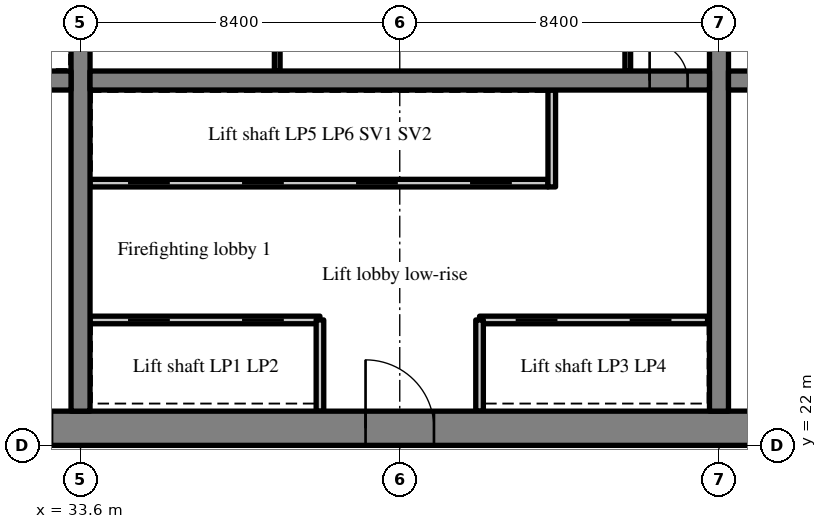
"""IFC4 building model, lengths in metres.
Left out: names, types, materials, properties, quantities, classifications, styles, units other than length and angle.
Written with IfcOpenShell. Run it as: python <this file> out.ifc"""

import sys

from ifc_helpers import new_model, si_unit, direction, frame, frame_2d, origin, place, context, subcontext, project, spatial, rectangle, extrude, source, transform, mapped, element, fill, save


model = new_model("IFC4")
c1 = context("Model", 3, precision=1e-05, world=origin(), true_north=direction((0.0, 1.0)))
c2 = subcontext(c1, "Body", "Model", "MODEL_VIEW")
j1 = project(units=[si_unit("LENGTHUNIT", "METRE"), si_unit("PLANEANGLEUNIT", "RADIAN")], contexts=[c1])
p1 = place(None, origin())
s1 = spatial("IfcSite", under=j1, at=p1, CompositionType="ELEMENT")
p2 = place(p1, origin())
s2 = spatial("IfcBuilding", under=s1, at=p2, CompositionType="ELEMENT")
p3 = place(p2, frame((0.0, 0.0, 133.2)))
s3 = spatial("IfcBuildingStorey", under=s2, at=p3, CompositionType="ELEMENT", Elevation=133.2)
m1 = source(origin(), c2, "Body", "SweptSolid", [
    extrude(rectangle(XDim=50.4, YDim=0.9, at=frame_2d((25.2, 0.0))), origin(), (0.0, 0.0, 1.0), 3.52),
])
p4 = place(p3, frame((25.2, 22.45, 0.0), z_axis=(0.0, 0.0, 1.0), x_axis=(1.0, 0.0, 0.0)))
e1 = element("IfcWall", 1, at=p4, inside=s3, PredefinedType="SHEAR", context=c2, shape_type="MappedRepresentation", body=[
    mapped(m1, transform((0.0, 0.0, 0.0), scale=1.0)),
])
m2 = source(origin(), c2, "Body", "SweptSolid", [
    extrude(rectangle(XDim=1.8, YDim=2.1, at=frame_2d((0.9, 1.05))), frame((0.0, 0.46, 0.0), z_axis=(0.0, -1.0, 0.0), x_axis=(1.0, 0.0, 0.0)), (0.0, 0.0, 1.0), 0.92),
])
p5 = place(p4, frame((15.9, 0.0, 0.0)))
e2 = element("IfcOpeningElement", 2, at=p5, cuts=e1, PredefinedType="OPENING", context=c2, shape_type="MappedRepresentation", body=[
    mapped(m2, transform((0.0, 0.0, 0.0), scale=1.0)),
])
m3 = source(origin(), c2, "Body", "SweptSolid", [
    extrude(rectangle(XDim=1.2, YDim=2.1, at=frame_2d((0.6, 1.05))), frame((0.0, 0.46, 0.0), z_axis=(0.0, -1.0, 0.0), x_axis=(1.0, 0.0, 0.0)), (0.0, 0.0, 1.0), 0.92),
])
p6 = place(p4, frame((26.975, 0.0, 0.0)))
e3 = element("IfcOpeningElement", 3, at=p6, cuts=e1, PredefinedType="OPENING", context=c2, shape_type="MappedRepresentation", body=[
    mapped(m3, transform((0.0, 0.0, 0.0), scale=1.0)),
])
m4 = source(origin(), c2, "Body", "SweptSolid", [
    extrude(rectangle(XDim=0.9, YDim=2.1, at=frame_2d((0.45, 1.05))), frame((0.0, 0.46, 0.0), z_axis=(0.0, -1.0, 0.0), x_axis=(1.0, 0.0, 0.0)), (0.0, 0.0, 1.0), 0.92),
])
p7 = place(p4, frame((34.5, 0.0, 0.0)))
e4 = element("IfcOpeningElement", 4, at=p7, cuts=e1, PredefinedType="OPENING", context=c2, shape_type="MappedRepresentation", body=[
    mapped(m4, transform((0.0, 0.0, 0.0), scale=1.0)),
])
p8 = place(p4, frame((31.5, 0.0, 0.0)))
e5 = element("IfcOpeningElement", 5, at=p8, cuts=e1, PredefinedType="OPENING", context=c2, shape_type="MappedRepresentation", body=[
    mapped(m4, transform((0.0, 0.0, 0.0), scale=1.0)),
])
p9 = place(p4, frame((39.788, 0.0, 0.0)))
e6 = element("IfcOpeningElement", 6, at=p9, cuts=e1, PredefinedType="OPENING", context=c2, shape_type="MappedRepresentation", body=[
    mapped(m4, transform((0.0, 0.0, 0.0), scale=1.0)),
])
p10 = place(p4, frame((36.762, 0.0, 0.0)))
e7 = element("IfcOpeningElement", 7, at=p10, cuts=e1, PredefinedType="OPENING", context=c2, shape_type="MappedRepresentation", body=[
    mapped(m4, transform((0.0, 0.0, 0.0), scale=1.0)),
])
p11 = place(p4, frame((6.45, 0.0, 0.0)))
e8 = element("IfcOpeningElement", 8, at=p11, cuts=e1, PredefinedType="OPENING", context=c2, shape_type="MappedRepresentation", body=[
    mapped(m3, transform((0.0, 0.0, 0.0), scale=1.0)),
])
p12 = place(p4, frame((47.775, 0.0, 0.0)))
e9 = element("IfcOpeningElement", 9, at=p12, cuts=e1, PredefinedType="OPENING", context=c2, shape_type="MappedRepresentation", body=[
    mapped(m3, transform((0.0, 0.0, 0.0), scale=1.0)),
])
m5 = source(origin(), c2, "Body", "SweptSolid", [
    extrude(rectangle(XDim=18.2, YDim=0.5, at=frame_2d((9.1, 0.0))), origin(), (0.0, 0.0, 1.0), 3.52),
])
p13 = place(p3, frame((33.6, 22.9, 0.0), z_axis=(0.0, 0.0, 1.0), x_axis=(0.0, 1.0, 0.0)))
e10 = element("IfcWall", 10, at=p13, inside=s3, PredefinedType="SHEAR", context=c2, shape_type="MappedRepresentation", body=[
    mapped(m5, transform((0.0, 0.0, 0.0), scale=1.0)),
])
m6 = source(origin(), c2, "Body", "SweptSolid", [
    extrude(rectangle(XDim=1.1, YDim=2.1, at=frame_2d((0.55, 1.05))), frame((0.0, 0.26, 0.0), z_axis=(0.0, -1.0, 0.0), x_axis=(1.0, 0.0, 0.0)), (0.0, 0.0, 1.0), 0.52),
])
p14 = place(p13, frame((12.55, 0.0, 0.0)))
e11 = element("IfcOpeningElement", 11, at=p14, cuts=e10, PredefinedType="OPENING", context=c2, shape_type="MappedRepresentation", body=[
    mapped(m6, transform((0.0, 0.0, 0.0), scale=1.0)),
])
p15 = place(p3, frame((50.4, 22.9, 0.0), z_axis=(0.0, 0.0, 1.0), x_axis=(0.0, 1.0, 0.0)))
e12 = element("IfcWall", 12, at=p15, inside=s3, PredefinedType="SHEAR", context=c2, shape_type="MappedRepresentation", body=[
    mapped(m5, transform((0.0, 0.0, 0.0), scale=1.0)),
])
p16 = place(p15, frame((12.55, 0.0, 0.0)))
e13 = element("IfcOpeningElement", 13, at=p16, cuts=e12, PredefinedType="OPENING", context=c2, shape_type="MappedRepresentation", body=[
    mapped(m6, transform((0.0, 0.0, 0.0), scale=1.0)),
])
m7 = source(origin(), c2, "Body", "SweptSolid", [
    extrude(rectangle(XDim=7.25, YDim=0.5, at=frame_2d((3.625, 0.0))), origin(), (0.0, 0.0, 1.0), 3.52),
])
p17 = place(p3, frame((26.1, 31.6, 0.0), z_axis=(0.0, 0.0, 1.0), x_axis=(1.0, 0.0, 0.0)))
e14 = element("IfcWall", 14, at=p17, inside=s3, PredefinedType="SHEAR", context=c2, shape_type="MappedRepresentation", body=[
    mapped(m7, transform((0.0, 0.0, 0.0), scale=1.0)),
])
p18 = place(p17, frame((5.6, 0.0, 0.0)))
e15 = element("IfcOpeningElement", 15, at=p18, cuts=e14, PredefinedType="OPENING", context=c2, shape_type="MappedRepresentation", body=[
    mapped(m6, transform((0.0, 0.0, 0.0), scale=1.0)),
])
m8 = source(origin(), c2, "Body", "SweptSolid", [
    extrude(rectangle(XDim=16.3, YDim=0.5, at=frame_2d((8.15, 0.0))), origin(), (0.0, 0.0, 1.0), 3.52),
])
p19 = place(p3, frame((33.85, 31.6, 0.0), z_axis=(0.0, 0.0, 1.0), x_axis=(1.0, 0.0, 0.0)))
e16 = element("IfcWall", 16, at=p19, inside=s3, PredefinedType="SHEAR", context=c2, shape_type="MappedRepresentation", body=[
    mapped(m8, transform((0.0, 0.0, 0.0), scale=1.0)),
])
m9 = source(origin(), c2, "Body", "SweptSolid", [
    extrude(rectangle(XDim=1.0, YDim=2.1, at=frame_2d((0.5, 1.05))), frame((0.0, 0.26, 0.0), z_axis=(0.0, -1.0, 0.0), x_axis=(1.0, 0.0, 0.0)), (0.0, 0.0, 1.0), 0.52),
])
p20 = place(p19, frame((14.725, 0.0, 0.0)))
e17 = element("IfcOpeningElement", 17, at=p20, cuts=e16, PredefinedType="OPENING", context=c2, shape_type="MappedRepresentation", body=[
    mapped(m9, transform((0.0, 0.0, 0.0), scale=1.0)),
])
m10 = source(origin(), c2, "Body", "SweptSolid", [
    extrude(rectangle(XDim=16.3, YDim=0.5, at=frame_2d((8.15, 0.0))), origin(), (0.0, 0.0, 1.0), 3.52),
])
p21 = place(p3, frame((50.65, 31.6, 0.0), z_axis=(0.0, 0.0, 1.0), x_axis=(1.0, 0.0, 0.0)))
e18 = element("IfcWall", 18, at=p21, inside=s3, PredefinedType="SHEAR", context=c2, shape_type="MappedRepresentation", body=[
    mapped(m10, transform((0.0, 0.0, 0.0), scale=1.0)),
])
p22 = place(p21, frame((0.575, 0.0, 0.0)))
e19 = element("IfcOpeningElement", 19, at=p22, cuts=e18, PredefinedType="OPENING", context=c2, shape_type="MappedRepresentation", body=[
    mapped(m9, transform((0.0, 0.0, 0.0), scale=1.0)),
])
m11 = source(origin(), c2, "Body", "SweptSolid", [
    extrude(rectangle(XDim=6.05, YDim=0.2, at=frame_2d((3.025, 0.0))), origin(), (0.0, 0.0, 1.0), 3.52),
])
p23 = place(p3, frame((33.85, 25.3, 0.0), z_axis=(0.0, 0.0, 1.0), x_axis=(1.0, 0.0, 0.0)))
e20 = element("IfcWall", 20, at=p23, inside=s3, PredefinedType="SOLIDWALL", context=c2, shape_type="MappedRepresentation", body=[
    mapped(m11, transform((0.0, 0.0, 0.0), scale=1.0)),
])
m12 = source(origin(), c2, "Body", "SweptSolid", [
    extrude(rectangle(XDim=1.1, YDim=2.1, at=frame_2d((0.55, 1.05))), frame((0.0, 0.11, 0.0), z_axis=(0.0, -1.0, 0.0), x_axis=(1.0, 0.0, 0.0)), (0.0, 0.0, 1.0), 0.22),
])
p24 = place(p23, frame((1.0, 0.0, 0.0)))
e21 = element("IfcOpeningElement", 21, at=p24, cuts=e20, PredefinedType="OPENING", context=c2, shape_type="MappedRepresentation", body=[
    mapped(m12, transform((0.0, 0.0, 0.0), scale=1.0)),
])
p25 = place(p23, frame((4.0, 0.0, 0.0)))
e22 = element("IfcOpeningElement", 22, at=p25, cuts=e20, PredefinedType="OPENING", context=c2, shape_type="MappedRepresentation", body=[
    mapped(m12, transform((0.0, 0.0, 0.0), scale=1.0)),
])
m13 = source(origin(), c2, "Body", "SweptSolid", [
    extrude(rectangle(XDim=6.0, YDim=0.2, at=frame_2d((3.0, 0.0))), origin(), (0.0, 0.0, 1.0), 3.52),
])
p26 = place(p3, frame((44.1, 25.3, 0.0), z_axis=(0.0, 0.0, 1.0), x_axis=(1.0, 0.0, 0.0)))
e23 = element("IfcWall", 23, at=p26, inside=s3, PredefinedType="SOLIDWALL", context=c2, shape_type="MappedRepresentation", body=[
    mapped(m13, transform((0.0, 0.0, 0.0), scale=1.0)),
])
p27 = place(p26, frame((0.95, 0.0, 0.0)))
e24 = element("IfcOpeningElement", 24, at=p27, cuts=e23, PredefinedType="OPENING", context=c2, shape_type="MappedRepresentation", body=[
    mapped(m12, transform((0.0, 0.0, 0.0), scale=1.0)),
])
p28 = place(p26, frame((3.95, 0.0, 0.0)))
e25 = element("IfcOpeningElement", 25, at=p28, cuts=e23, PredefinedType="OPENING", context=c2, shape_type="MappedRepresentation", body=[
    mapped(m12, transform((0.0, 0.0, 0.0), scale=1.0)),
])
m14 = source(origin(), c2, "Body", "SweptSolid", [
    extrude(rectangle(XDim=12.05, YDim=0.2, at=frame_2d((6.025, 0.0))), origin(), (0.0, 0.0, 1.0), 3.52),
])
p29 = place(p3, frame((33.85, 28.9, 0.0), z_axis=(0.0, 0.0, 1.0), x_axis=(1.0, 0.0, 0.0)))
e26 = element("IfcWall", 26, at=p29, inside=s3, PredefinedType="SOLIDWALL", context=c2, shape_type="MappedRepresentation", body=[
    mapped(m14, transform((0.0, 0.0, 0.0), scale=1.0)),
])
p30 = place(p29, frame((1.0, 0.0, 0.0)))
e27 = element("IfcOpeningElement", 27, at=p30, cuts=e26, PredefinedType="OPENING", context=c2, shape_type="MappedRepresentation", body=[
    mapped(m12, transform((0.0, 0.0, 0.0), scale=1.0)),
])
p31 = place(p29, frame((4.0, 0.0, 0.0)))
e28 = element("IfcOpeningElement", 28, at=p31, cuts=e26, PredefinedType="OPENING", context=c2, shape_type="MappedRepresentation", body=[
    mapped(m12, transform((0.0, 0.0, 0.0), scale=1.0)),
])
p32 = place(p29, frame((7.0, 0.0, 0.0)))
e29 = element("IfcOpeningElement", 29, at=p32, cuts=e26, PredefinedType="OPENING", context=c2, shape_type="MappedRepresentation", body=[
    mapped(m12, transform((0.0, 0.0, 0.0), scale=1.0)),
])
p33 = place(p29, frame((10.0, 0.0, 0.0)))
e30 = element("IfcOpeningElement", 30, at=p33, cuts=e26, PredefinedType="OPENING", context=c2, shape_type="MappedRepresentation", body=[
    mapped(m12, transform((0.0, 0.0, 0.0), scale=1.0)),
])
m15 = source(origin(), c2, "Body", "SweptSolid", [
    extrude(rectangle(XDim=2.4, YDim=0.2, at=frame_2d((1.2, 0.0))), origin(), (0.0, 0.0, 1.0), 3.52),
])
for number, where, z_axis, x_axis in (
    (31, (39.9, 22.9, 0.0), (0.0, 0.0, 1.0), (0.0, 1.0, 0.0)),
    (32, (44.1, 22.9, 0.0), (0.0, 0.0, 1.0), (0.0, 1.0, 0.0)),
):
    element("IfcWall", number, at=place(p3, frame(where, z_axis=z_axis, x_axis=x_axis)), inside=s3, PredefinedType="SOLIDWALL", context=c2, shape_type="MappedRepresentation", body=[
        mapped(m15, transform((0.0, 0.0, 0.0), scale=1.0)),
    ])
m16 = source(origin(), c2, "Body", "SweptSolid", [
    extrude(rectangle(XDim=2.55, YDim=0.2, at=frame_2d((1.275, 0.0))), origin(), (0.0, 0.0, 1.0), 3.52),
])
p34 = place(p3, frame((46.0, 28.8, 0.0), z_axis=(0.0, 0.0, 1.0), x_axis=(0.0, 1.0, 0.0)))
e33 = element("IfcWall", 33, at=p34, inside=s3, PredefinedType="SOLIDWALL", context=c2, shape_type="MappedRepresentation", body=[
    mapped(m16, transform((0.0, 0.0, 0.0), scale=1.0)),
])
m17 = source(origin(), c2, "Body", "SweptSolid", [
    extrude(rectangle(XDim=3.15, YDim=0.15, at=frame_2d((1.575, 0.0))), origin(), (0.0, 0.0, 1.0), 3.52),
])
for number, where, z_axis, x_axis in (
    (34, (48.0, 31.85, 0.0), (0.0, 0.0, 1.0), (0.0, 1.0, 0.0)),
    (35, (38.776, 31.85, 0.0), (0.0, 0.0, 1.0), (0.0, 1.0, 0.0)),
):
    element("IfcWall", number, at=place(p3, frame(where, z_axis=z_axis, x_axis=x_axis)), inside=s3, PredefinedType="PARTITIONING", context=c2, shape_type="MappedRepresentation", body=[
        mapped(m17, transform((0.0, 0.0, 0.0), scale=1.0)),
    ])
m18 = source(origin(), c2, "Body", "SweptSolid", [
    extrude(rectangle(XDim=1.8, YDim=2.1, at=frame_2d((0.9, 1.05))), frame((0.0, 0.375, 0.0), z_axis=(0.0, -1.0, 0.0), x_axis=(1.0, 0.0, 0.0)), (0.0, 0.0, 1.0), 0.05),
])
p35 = place(p5, origin())
e36 = element("IfcDoor", 36, at=p35, inside=s3, OperationType="DOUBLE_DOOR_SINGLE_SWING", PredefinedType="DOOR", context=c2, shape_type="MappedRepresentation", body=[
    mapped(m18, transform((0.0, 0.0, 0.0), scale=1.0)),
])
fill(e2, e36)
m19 = source(origin(), c2, "Body", "SweptSolid", [
    extrude(rectangle(XDim=1.0, YDim=2.1, at=frame_2d((0.5, 1.05))), frame((0.0, 0.025, 0.0), z_axis=(0.0, -1.0, 0.0), x_axis=(1.0, 0.0, 0.0)), (0.0, 0.0, 1.0), 0.05),
])
p36 = place(p20, origin())
e37 = element("IfcDoor", 37, at=p36, inside=s3, OperationType="SINGLE_SWING_LEFT", PredefinedType="DOOR", context=c2, shape_type="MappedRepresentation", body=[
    mapped(m19, transform((0.0, 0.0, 0.0), scale=1.0)),
])
fill(e17, e37)
m20 = source(origin(), c2, "Body", "SweptSolid", [
    extrude(rectangle(XDim=1.1, YDim=2.1, at=frame_2d((0.55, 1.05))), frame((0.0, 0.025, 0.0), z_axis=(0.0, -1.0, 0.0), x_axis=(1.0, 0.0, 0.0)), (0.0, 0.0, 1.0), 0.05),
])
p37 = place(p24, origin())
e38 = element("IfcDoor", 38, at=p37, inside=s3, OperationType="SLIDING_TO_LEFT", PredefinedType="DOOR", context=c2, shape_type="MappedRepresentation", body=[
    mapped(m20, transform((0.0, 0.0, 0.0), scale=1.0)),
])
fill(e21, e38)
p38 = place(p25, origin())
e39 = element("IfcDoor", 39, at=p38, inside=s3, OperationType="SLIDING_TO_RIGHT", PredefinedType="DOOR", context=c2, shape_type="MappedRepresentation", body=[
    mapped(m20, transform((0.0, 0.0, 0.0), scale=1.0)),
])
fill(e22, e39)
p39 = place(p27, origin())
e40 = element("IfcDoor", 40, at=p39, inside=s3, OperationType="SLIDING_TO_LEFT", PredefinedType="DOOR", context=c2, shape_type="MappedRepresentation", body=[
    mapped(m20, transform((0.0, 0.0, 0.0), scale=1.0)),
])
fill(e24, e40)
p40 = place(p28, origin())
e41 = element("IfcDoor", 41, at=p40, inside=s3, OperationType="SLIDING_TO_RIGHT", PredefinedType="DOOR", context=c2, shape_type="MappedRepresentation", body=[
    mapped(m20, transform((0.0, 0.0, 0.0), scale=1.0)),
])
fill(e25, e41)
p41 = place(p30, origin())
e42 = element("IfcDoor", 42, at=p41, inside=s3, OperationType="SLIDING_TO_LEFT", PredefinedType="DOOR", context=c2, shape_type="MappedRepresentation", body=[
    mapped(m20, transform((0.0, 0.0, 0.0), scale=1.0)),
])
fill(e27, e42)
p42 = place(p31, origin())
e43 = element("IfcDoor", 43, at=p42, inside=s3, OperationType="SLIDING_TO_RIGHT", PredefinedType="DOOR", context=c2, shape_type="MappedRepresentation", body=[
    mapped(m20, transform((0.0, 0.0, 0.0), scale=1.0)),
])
fill(e28, e43)
p43 = place(p32, origin())
e44 = element("IfcDoor", 44, at=p43, inside=s3, OperationType="SLIDING_TO_LEFT", PredefinedType="DOOR", context=c2, shape_type="MappedRepresentation", body=[
    mapped(m20, transform((0.0, 0.0, 0.0), scale=1.0)),
])
fill(e29, e44)
p44 = place(p33, origin())
e45 = element("IfcDoor", 45, at=p44, inside=s3, OperationType="SLIDING_TO_RIGHT", PredefinedType="DOOR", context=c2, shape_type="MappedRepresentation", body=[
    mapped(m20, transform((0.0, 0.0, 0.0), scale=1.0)),
])
fill(e30, e45)
save(model, sys.argv[1])
